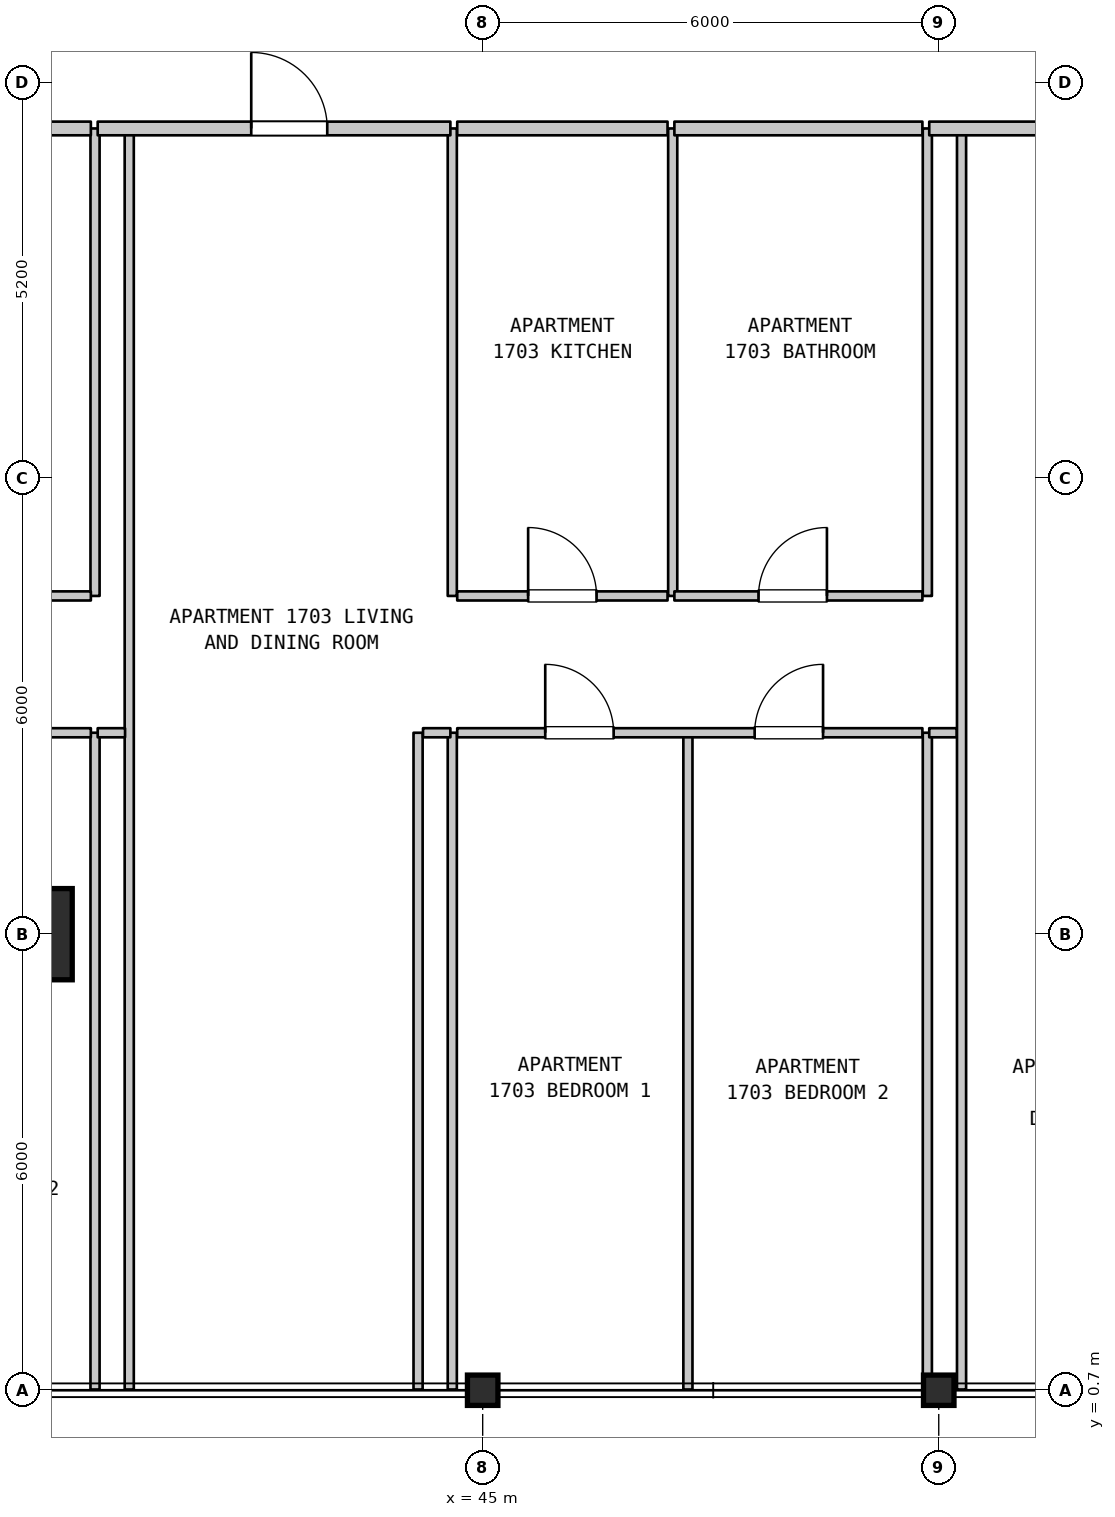
"""IFC4 building model, lengths in metres.
Left out: names, types, materials, properties, quantities, classifications, styles, units other than length and angle.
Written with IfcOpenShell. Run it as: python <this file> out.ifc"""

import sys

from ifc_helpers import new_model, si_unit, direction, frame, frame_2d, origin, origin_2d, place, context, subcontext, project, spatial, rectangle, i_section, extrude, element, fill, save


model = new_model("IFC4")
c1 = context("Model", 3, precision=1e-05, world=origin(), true_north=direction((0.0, 1.0)))
c2 = subcontext(c1, "Body", "Model", "MODEL_VIEW")
j1 = project(units=[si_unit("LENGTHUNIT", "METRE"), si_unit("PLANEANGLEUNIT", "RADIAN")], contexts=[c1])
p1 = place(None, origin())
s1 = spatial("IfcSite", under=j1, at=p1, CompositionType="ELEMENT")
p2 = place(p1, origin())
s2 = spatial("IfcBuilding", under=s1, at=p2, CompositionType="ELEMENT")
p3 = place(p2, frame((0.0, 0.0, 73.8)))
s3 = spatial("IfcBuildingStorey", under=s2, at=p3, CompositionType="ELEMENT", Elevation=73.8)
p4 = place(p3, frame((39.0, 6.7, 0.0), z_axis=(0.0, 0.0, 1.0), x_axis=(1.0, 0.0, 0.0)))
e1 = element("IfcColumn", 1, at=p4, inside=s3, PredefinedType="COLUMN", context=c2, shape_type="SweptSolid", body=[
    extrude(rectangle(XDim=1.2, YDim=1.2, at=origin_2d()), origin(), (0.0, 0.0, 1.0), 3.7),
])
for number, where, z_axis, x_axis in (
    (2, (45.0, 0.7, 0.0), (0.0, 0.0, 1.0), (1.0, 0.0, 0.0)),
    (3, (51.0, 0.7, 0.0), (0.0, 0.0, 1.0), (1.0, 0.0, 0.0)),
):
    element("IfcColumn", number, at=place(p3, frame(where, z_axis=z_axis, x_axis=x_axis)), inside=s3, PredefinedType="COLUMN", context=c2, shape_type="SweptSolid", body=[
        extrude(i_section(OverallWidth=0.401, OverallDepth=0.399, WebThickness=0.025, FlangeThickness=0.04, FilletRadius=0.015, at=origin_2d()), origin(), (0.0, 0.0, 1.0), 3.7),
    ])
p5 = place(p3, frame((39.9, 0.71, 0.0), z_axis=(0.0, 0.0, 1.0), x_axis=(0.0, 1.0, 0.0)))
e4 = element("IfcWall", 4, at=p5, inside=s3, PredefinedType="PARTITIONING", context=c2, shape_type="SweptSolid", body=[
    extrude(rectangle(XDim=8.64, YDim=0.12, at=frame_2d((4.32, 0.0))), origin(), (0.0, 0.0, 1.0), 3.385),
])
p6 = place(p3, frame((39.9, 11.15, 0.0), z_axis=(0.0, 0.0, 1.0), x_axis=(0.0, 1.0, 0.0)))
e5 = element("IfcWall", 5, at=p6, inside=s3, PredefinedType="PARTITIONING", context=c2, shape_type="SweptSolid", body=[
    extrude(rectangle(XDim=6.15, YDim=0.12, at=frame_2d((3.075, 0.0))), origin(), (0.0, 0.0, 1.0), 3.385),
])
p7 = place(p3, frame((40.35, 0.71, 0.0), z_axis=(0.0, 0.0, 1.0), x_axis=(0.0, 1.0, 0.0)))
e6 = element("IfcWall", 6, at=p7, inside=s3, PredefinedType="PARTITIONING", context=c2, shape_type="SweptSolid", body=[
    extrude(rectangle(XDim=16.59, YDim=0.12, at=frame_2d((8.295, 0.0))), origin(), (0.0, 0.0, 1.0), 3.385),
])
for number, where, z_axis, x_axis in (
    (7, (44.15, 0.71, 0.0), (0.0, 0.0, 1.0), (0.0, 1.0, 0.0)),
    (8, (44.6, 0.71, 0.0), (0.0, 0.0, 1.0), (0.0, 1.0, 0.0)),
):
    element("IfcWall", number, at=place(p3, frame(where, z_axis=z_axis, x_axis=x_axis)), inside=s3, PredefinedType="PARTITIONING", context=c2, shape_type="SweptSolid", body=[
        extrude(rectangle(XDim=8.64, YDim=0.12, at=frame_2d((4.32, 0.0))), origin(), (0.0, 0.0, 1.0), 3.385),
    ])
for number, where, z_axis, x_axis in (
    (9, (44.6, 11.15, 0.0), (0.0, 0.0, 1.0), (0.0, 1.0, 0.0)),
    (10, (47.5, 11.15, 0.0), (0.0, 0.0, 1.0), (0.0, 1.0, 0.0)),
):
    element("IfcWall", number, at=place(p3, frame(where, z_axis=z_axis, x_axis=x_axis)), inside=s3, PredefinedType="PARTITIONING", context=c2, shape_type="SweptSolid", body=[
        extrude(rectangle(XDim=6.15, YDim=0.12, at=frame_2d((3.075, 0.0))), origin(), (0.0, 0.0, 1.0), 3.385),
    ])
for number, where, z_axis, x_axis in (
    (11, (47.7, 0.71, 0.0), (0.0, 0.0, 1.0), (0.0, 1.0, 0.0)),
    (12, (50.85, 0.71, 0.0), (0.0, 0.0, 1.0), (0.0, 1.0, 0.0)),
):
    element("IfcWall", number, at=place(p3, frame(where, z_axis=z_axis, x_axis=x_axis)), inside=s3, PredefinedType="PARTITIONING", context=c2, shape_type="SweptSolid", body=[
        extrude(rectangle(XDim=8.64, YDim=0.12, at=frame_2d((4.32, 0.0))), origin(), (0.0, 0.0, 1.0), 3.385),
    ])
p8 = place(p3, frame((50.85, 11.15, 0.0), z_axis=(0.0, 0.0, 1.0), x_axis=(0.0, 1.0, 0.0)))
e13 = element("IfcWall", 13, at=p8, inside=s3, PredefinedType="PARTITIONING", context=c2, shape_type="SweptSolid", body=[
    extrude(rectangle(XDim=6.15, YDim=0.12, at=frame_2d((3.075, 0.0))), origin(), (0.0, 0.0, 1.0), 3.385),
])
p9 = place(p3, frame((51.3, 0.71, 0.0), z_axis=(0.0, 0.0, 1.0), x_axis=(0.0, 1.0, 0.0)))
e14 = element("IfcWall", 14, at=p9, inside=s3, PredefinedType="PARTITIONING", context=c2, shape_type="SweptSolid", body=[
    extrude(rectangle(XDim=16.59, YDim=0.12, at=frame_2d((8.295, 0.0))), origin(), (0.0, 0.0, 1.0), 3.385),
])
p10 = place(p3, frame((33.785, 9.35, 0.0), z_axis=(0.0, 0.0, 1.0), x_axis=(1.0, 0.0, 0.0)))
e15 = element("IfcWall", 15, at=p10, inside=s3, PredefinedType="PARTITIONING", context=c2, shape_type="SweptSolid", body=[
    extrude(rectangle(XDim=6.06, YDim=0.12, at=frame_2d((3.03, 0.0))), origin(), (0.0, 0.0, 1.0), 3.385),
])
p11 = place(p10, frame((1.144, 0.0, 0.0)))
e16 = element("IfcOpeningElement", 16, at=p11, cuts=e15, PredefinedType="OPENING", context=c2, shape_type="SweptSolid", body=[
    extrude(rectangle(XDim=0.9, YDim=2.15, at=frame_2d((0.45, 1.075))), frame((0.0, 0.07, 0.0), z_axis=(0.0, -1.0, 0.0), x_axis=(1.0, 0.0, 0.0)), (0.0, 0.0, 1.0), 0.14),
])
p12 = place(p10, frame((3.869, 0.0, 0.0)))
e17 = element("IfcOpeningElement", 17, at=p12, cuts=e15, PredefinedType="OPENING", context=c2, shape_type="SweptSolid", body=[
    extrude(rectangle(XDim=0.9, YDim=2.15, at=frame_2d((0.45, 1.075))), frame((0.0, 0.07, 0.0), z_axis=(0.0, -1.0, 0.0), x_axis=(1.0, 0.0, 0.0)), (0.0, 0.0, 1.0), 0.14),
])
for number, where, z_axis, x_axis in (
    (18, (39.935, 9.35, 0.0), (0.0, 0.0, 1.0), (1.0, 0.0, 0.0)),
    (19, (44.215, 9.35, 0.0), (0.0, 0.0, 1.0), (1.0, 0.0, 0.0)),
):
    element("IfcWall", number, at=place(p3, frame(where, z_axis=z_axis, x_axis=x_axis)), inside=s3, PredefinedType="PARTITIONING", context=c2, shape_type="SweptSolid", body=[
        extrude(rectangle(XDim=0.36, YDim=0.12, at=frame_2d((0.18, 0.0))), origin(), (0.0, 0.0, 1.0), 3.385),
    ])
p13 = place(p3, frame((44.665, 9.35, 0.0), z_axis=(0.0, 0.0, 1.0), x_axis=(1.0, 0.0, 0.0)))
e20 = element("IfcWall", 20, at=p13, inside=s3, PredefinedType="PARTITIONING", context=c2, shape_type="SweptSolid", body=[
    extrude(rectangle(XDim=6.12, YDim=0.12, at=frame_2d((3.06, 0.0))), origin(), (0.0, 0.0, 1.0), 3.385),
])
p14 = place(p13, frame((1.158, 0.0, 0.0)))
e21 = element("IfcOpeningElement", 21, at=p14, cuts=e20, PredefinedType="OPENING", context=c2, shape_type="SweptSolid", body=[
    extrude(rectangle(XDim=0.9, YDim=2.15, at=frame_2d((0.45, 1.075))), frame((0.0, 0.07, 0.0), z_axis=(0.0, -1.0, 0.0), x_axis=(1.0, 0.0, 0.0)), (0.0, 0.0, 1.0), 0.14),
])
p15 = place(p13, frame((3.913, 0.0, 0.0)))
e22 = element("IfcOpeningElement", 22, at=p15, cuts=e20, PredefinedType="OPENING", context=c2, shape_type="SweptSolid", body=[
    extrude(rectangle(XDim=0.9, YDim=2.15, at=frame_2d((0.45, 1.075))), frame((0.0, 0.07, 0.0), z_axis=(0.0, -1.0, 0.0), x_axis=(1.0, 0.0, 0.0)), (0.0, 0.0, 1.0), 0.14),
])
p16 = place(p3, frame((50.875, 9.35, 0.0), z_axis=(0.0, 0.0, 1.0), x_axis=(1.0, 0.0, 0.0)))
e23 = element("IfcWall", 23, at=p16, inside=s3, PredefinedType="PARTITIONING", context=c2, shape_type="SweptSolid", body=[
    extrude(rectangle(XDim=0.36, YDim=0.12, at=frame_2d((0.18, 0.0))), origin(), (0.0, 0.0, 1.0), 3.385),
])
p17 = place(p3, frame((36.614, 11.15, 0.0), z_axis=(0.0, 0.0, 1.0), x_axis=(1.0, 0.0, 0.0)))
e24 = element("IfcWall", 24, at=p17, inside=s3, PredefinedType="PARTITIONING", context=c2, shape_type="SweptSolid", body=[
    extrude(rectangle(XDim=3.231, YDim=0.12, at=frame_2d((1.615, 0.0))), origin(), (0.0, 0.0, 1.0), 3.385),
])
p18 = place(p17, frame((1.092, 0.0, 0.0)))
e25 = element("IfcOpeningElement", 25, at=p18, cuts=e24, PredefinedType="OPENING", context=c2, shape_type="SweptSolid", body=[
    extrude(rectangle(XDim=0.9, YDim=2.1, at=frame_2d((0.45, 1.05))), frame((0.0, 0.07, 0.0), z_axis=(0.0, -1.0, 0.0), x_axis=(1.0, 0.0, 0.0)), (0.0, 0.0, 1.0), 0.14),
])
p19 = place(p3, frame((44.665, 11.15, 0.0), z_axis=(0.0, 0.0, 1.0), x_axis=(1.0, 0.0, 0.0)))
e26 = element("IfcWall", 26, at=p19, inside=s3, PredefinedType="PARTITIONING", context=c2, shape_type="SweptSolid", body=[
    extrude(rectangle(XDim=2.767, YDim=0.12, at=frame_2d((1.383, 0.0))), origin(), (0.0, 0.0, 1.0), 3.385),
])
p20 = place(p19, frame((0.933, 0.0, 0.0)))
e27 = element("IfcOpeningElement", 27, at=p20, cuts=e26, PredefinedType="OPENING", context=c2, shape_type="SweptSolid", body=[
    extrude(rectangle(XDim=0.9, YDim=2.15, at=frame_2d((0.45, 1.075))), frame((0.0, 0.07, 0.0), z_axis=(0.0, -1.0, 0.0), x_axis=(1.0, 0.0, 0.0)), (0.0, 0.0, 1.0), 0.14),
])
p21 = place(p3, frame((47.522, 11.15, 0.0), z_axis=(0.0, 0.0, 1.0), x_axis=(1.0, 0.0, 0.0)))
e28 = element("IfcWall", 28, at=p21, inside=s3, PredefinedType="PARTITIONING", context=c2, shape_type="SweptSolid", body=[
    extrude(rectangle(XDim=3.263, YDim=0.12, at=frame_2d((1.631, 0.0))), origin(), (0.0, 0.0, 1.0), 3.385),
])
p22 = place(p21, frame((1.107, 0.0, 0.0)))
e29 = element("IfcOpeningElement", 29, at=p22, cuts=e28, PredefinedType="OPENING", context=c2, shape_type="SweptSolid", body=[
    extrude(rectangle(XDim=0.9, YDim=2.1, at=frame_2d((0.45, 1.05))), frame((0.0, 0.07, 0.0), z_axis=(0.0, -1.0, 0.0), x_axis=(1.0, 0.0, 0.0)), (0.0, 0.0, 1.0), 0.14),
])
p23 = place(p3, frame((36.614, 17.3, 0.0), z_axis=(0.0, 0.0, 1.0), x_axis=(1.0, 0.0, 0.0)))
e30 = element("IfcWall", 30, at=p23, inside=s3, PredefinedType="STANDARD", context=c2, shape_type="SweptSolid", body=[
    extrude(rectangle(XDim=3.231, YDim=0.18, at=frame_2d((1.615, 0.0))), origin(), (0.0, 0.0, 1.0), 3.385),
])
p24 = place(p3, frame((39.935, 17.3, 0.0), z_axis=(0.0, 0.0, 1.0), x_axis=(1.0, 0.0, 0.0)))
e31 = element("IfcWall", 31, at=p24, inside=s3, PredefinedType="STANDARD", context=c2, shape_type="SweptSolid", body=[
    extrude(rectangle(XDim=4.64, YDim=0.18, at=frame_2d((2.32, 0.0))), origin(), (0.0, 0.0, 1.0), 3.385),
])
p25 = place(p24, frame((2.02, 0.0, 0.0)))
e32 = element("IfcOpeningElement", 32, at=p25, cuts=e31, PredefinedType="OPENING", context=c2, shape_type="SweptSolid", body=[
    extrude(rectangle(XDim=1.0, YDim=2.15, at=frame_2d((0.5, 1.075))), frame((0.0, 0.1, 0.0), z_axis=(0.0, -1.0, 0.0), x_axis=(1.0, 0.0, 0.0)), (0.0, 0.0, 1.0), 0.2),
])
p26 = place(p3, frame((44.665, 17.3, 0.0), z_axis=(0.0, 0.0, 1.0), x_axis=(1.0, 0.0, 0.0)))
e33 = element("IfcWall", 33, at=p26, inside=s3, PredefinedType="STANDARD", context=c2, shape_type="SweptSolid", body=[
    extrude(rectangle(XDim=2.767, YDim=0.18, at=frame_2d((1.383, 0.0))), origin(), (0.0, 0.0, 1.0), 3.385),
])
p27 = place(p3, frame((47.522, 17.3, 0.0), z_axis=(0.0, 0.0, 1.0), x_axis=(1.0, 0.0, 0.0)))
e34 = element("IfcWall", 34, at=p27, inside=s3, PredefinedType="STANDARD", context=c2, shape_type="SweptSolid", body=[
    extrude(rectangle(XDim=3.263, YDim=0.18, at=frame_2d((1.631, 0.0))), origin(), (0.0, 0.0, 1.0), 3.385),
])
p28 = place(p3, frame((50.875, 17.3, 0.0), z_axis=(0.0, 0.0, 1.0), x_axis=(1.0, 0.0, 0.0)))
e35 = element("IfcWall", 35, at=p28, inside=s3, PredefinedType="STANDARD", context=c2, shape_type="SweptSolid", body=[
    extrude(rectangle(XDim=3.96, YDim=0.18, at=frame_2d((1.98, 0.0))), origin(), (0.0, 0.0, 1.0), 3.385),
])
p29 = place(p28, frame((1.609, 0.0, 0.0)))
e36 = element("IfcOpeningElement", 36, at=p29, cuts=e35, PredefinedType="OPENING", context=c2, shape_type="SweptSolid", body=[
    extrude(rectangle(XDim=1.0, YDim=2.15, at=frame_2d((0.5, 1.075))), frame((0.0, 0.1, 0.0), z_axis=(0.0, -1.0, 0.0), x_axis=(1.0, 0.0, 0.0)), (0.0, 0.0, 1.0), 0.2),
])
p30 = place(p14, origin())
e37 = element("IfcDoor", 37, at=p30, inside=s3, OperationType="SINGLE_SWING_LEFT", PredefinedType="DOOR", context=c2, shape_type="SweptSolid", body=[
    extrude(rectangle(XDim=0.9, YDim=2.15, at=frame_2d((0.45, 1.075))), frame((0.0, 0.025, 0.0), z_axis=(0.0, -1.0, 0.0), x_axis=(1.0, 0.0, 0.0)), (0.0, 0.0, 1.0), 0.05),
])
fill(e21, e37)
p31 = place(p15, origin())
e38 = element("IfcDoor", 38, at=p31, inside=s3, OperationType="SINGLE_SWING_RIGHT", PredefinedType="DOOR", context=c2, shape_type="SweptSolid", body=[
    extrude(rectangle(XDim=0.9, YDim=2.15, at=frame_2d((0.45, 1.075))), frame((0.0, 0.025, 0.0), z_axis=(0.0, -1.0, 0.0), x_axis=(1.0, 0.0, 0.0)), (0.0, 0.0, 1.0), 0.05),
])
fill(e22, e38)
p32 = place(p20, origin())
e39 = element("IfcDoor", 39, at=p32, inside=s3, OperationType="SINGLE_SWING_LEFT", PredefinedType="DOOR", context=c2, shape_type="SweptSolid", body=[
    extrude(rectangle(XDim=0.9, YDim=2.15, at=frame_2d((0.45, 1.075))), frame((0.0, 0.025, 0.0), z_axis=(0.0, -1.0, 0.0), x_axis=(1.0, 0.0, 0.0)), (0.0, 0.0, 1.0), 0.05),
])
fill(e27, e39)
p33 = place(p22, origin())
e40 = element("IfcDoor", 40, at=p33, inside=s3, OperationType="SINGLE_SWING_RIGHT", PredefinedType="DOOR", context=c2, shape_type="SweptSolid", body=[
    extrude(rectangle(XDim=0.9, YDim=2.1, at=frame_2d((0.45, 1.05))), frame((0.0, 0.025, 0.0), z_axis=(0.0, -1.0, 0.0), x_axis=(1.0, 0.0, 0.0)), (0.0, 0.0, 1.0), 0.05),
])
fill(e29, e40)
p34 = place(p25, origin())
e41 = element("IfcDoor", 41, at=p34, inside=s3, OperationType="SINGLE_SWING_LEFT", PredefinedType="DOOR", context=c2, shape_type="SweptSolid", body=[
    extrude(rectangle(XDim=1.0, YDim=2.15, at=frame_2d((0.5, 1.075))), frame((0.0, 0.025, 0.0), z_axis=(0.0, -1.0, 0.0), x_axis=(1.0, 0.0, 0.0)), (0.0, 0.0, 1.0), 0.05),
])
fill(e32, e41)
save(model, sys.argv[1])
